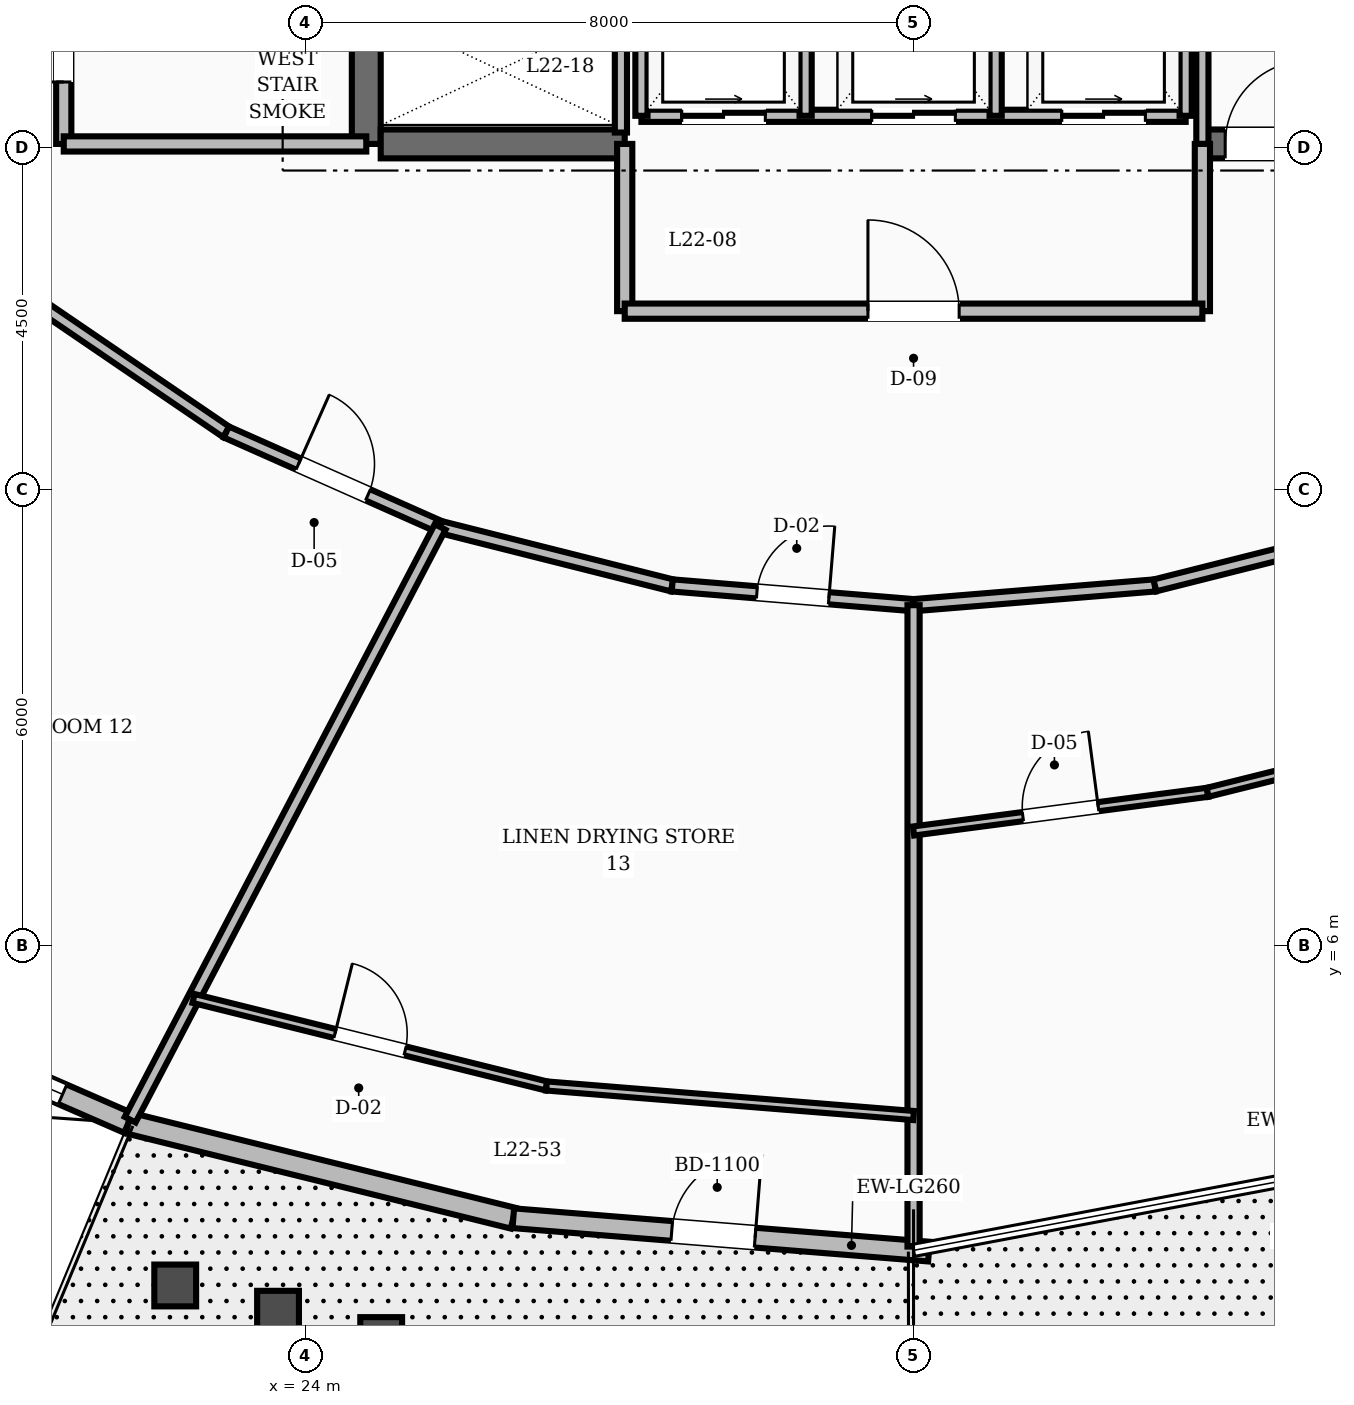
"""IFC4 building model, lengths in metres.
Left out: names, types, materials, properties, quantities, classifications, styles, units other than length and angle.
Written with IfcOpenShell. Run it as: python <this file> out.ifc"""

import sys

from ifc_helpers import new_model, si_unit, direction, frame, frame_2d, origin, place, context, subcontext, project, spatial, rectangle, extrude, element, fill, save


model = new_model("IFC4")
c1 = context("Model", 3, precision=1e-05, world=origin(), true_north=direction((0.0, 1.0)))
c2 = subcontext(c1, "Body", "Model", "MODEL_VIEW")
j1 = project(units=[si_unit("LENGTHUNIT", "METRE"), si_unit("PLANEANGLEUNIT", "RADIAN")], contexts=[c1])
p1 = place(None, origin())
s1 = spatial("IfcSite", under=j1, at=p1, CompositionType="ELEMENT")
p2 = place(p1, origin())
s2 = spatial("IfcBuilding", under=s1, at=p2, CompositionType="ELEMENT")
p3 = place(p2, frame((0.0, 0.0, 88.0)))
s3 = spatial("IfcBuildingStorey", under=s2, at=p3, CompositionType="ELEMENT", Elevation=88.0)
p4 = place(p3, frame((24.8, 16.55, 0.0), z_axis=(0.0, 0.0, 1.0), x_axis=(0.0, 1.0, 0.0)))
e1 = element("IfcWall", 1, at=p4, inside=s3, PredefinedType="SHEAR", context=c2, shape_type="SweptSolid", body=[
    extrude(rectangle(XDim=6.3, YDim=0.38, at=frame_2d((3.15, 0.0))), origin(), (0.0, 0.0, 1.0), 3.6),
])
p5 = place(p3, frame((24.99, 16.55, 0.0), z_axis=(0.0, 0.0, 1.0), x_axis=(1.0, 0.0, 0.0)))
e2 = element("IfcWall", 2, at=p5, inside=s3, PredefinedType="SHEAR", context=c2, shape_type="SweptSolid", body=[
    extrude(rectangle(XDim=3.21, YDim=0.38, at=frame_2d((1.605, 0.0))), origin(), (0.0, 0.0, 1.0), 3.6),
])
p6 = place(p3, frame((35.8, 16.55, 0.0), z_axis=(0.0, 0.0, 1.0), x_axis=(1.0, 0.0, 0.0)))
e3 = element("IfcWall", 3, at=p6, inside=s3, PredefinedType="SHEAR", context=c2, shape_type="SweptSolid", body=[
    extrude(rectangle(XDim=3.21, YDim=0.38, at=frame_2d((1.605, 0.0))), origin(), (0.0, 0.0, 1.0), 3.6),
])
p7 = place(p6, frame((0.3, 0.0, 0.0)))
e4 = element("IfcOpeningElement", 4, at=p7, cuts=e3, PredefinedType="OPENING", context=c2, shape_type="SweptSolid", body=[
    extrude(rectangle(XDim=1.1, YDim=2.1, at=frame_2d((0.55, 1.05))), frame((0.0, 0.2, 0.0), z_axis=(0.0, -1.0, 0.0), x_axis=(1.0, 0.0, 0.0)), (0.0, 0.0, 1.0), 0.4),
])
p8 = place(p3, frame((17.004, 5.702, 0.0), z_axis=(0.0, 0.0, 1.0), x_axis=(0.916744158445, -0.399474840205, 0.0)))
e5 = element("IfcWall", 5, at=p8, inside=s3, PredefinedType="STANDARD", context=c2, shape_type="SweptSolid", body=[
    extrude(rectangle(XDim=5.09, YDim=0.28, at=frame_2d((2.545, 0.0))), origin(), (0.0, 0.0, 1.0), 2.71),
])
p9 = place(p8, frame((0.945, 0.0, 0.8)))
e6 = element("IfcOpeningElement", 6, at=p9, cuts=e5, PredefinedType="OPENING", context=c2, shape_type="SweptSolid", body=[
    extrude(rectangle(XDim=3.2, YDim=1.65, at=frame_2d((1.6, 0.825))), frame((0.0, 0.15, 0.0), z_axis=(0.0, -1.0, 0.0), x_axis=(1.0, 0.0, 0.0)), (0.0, 0.0, 1.0), 0.3),
])
p10 = place(p3, frame((21.671, 3.669, 0.0), z_axis=(0.0, 0.0, 1.0), x_axis=(0.970745192344, -0.240111997913, 0.0)))
e7 = element("IfcWall", 7, at=p10, inside=s3, PredefinedType="STANDARD", context=c2, shape_type="SweptSolid", body=[
    extrude(rectangle(XDim=5.216, YDim=0.28, at=frame_2d((2.608, 0.0))), origin(), (0.0, 0.0, 1.0), 2.71),
])
p11 = place(p3, frame((26.734, 2.417, 0.0), z_axis=(0.0, 0.0, 1.0), x_axis=(0.996792879397, -0.080024718573, 0.0)))
e8 = element("IfcWall", 8, at=p11, inside=s3, PredefinedType="STANDARD", context=c2, shape_type="SweptSolid", body=[
    extrude(rectangle(XDim=5.485, YDim=0.26, at=frame_2d((2.743, 0.0))), origin(), (0.0, 0.0, 1.0), 2.71),
])
p12 = place(p11, frame((2.091, 0.0, 0.0)))
e9 = element("IfcOpeningElement", 9, at=p12, cuts=e8, PredefinedType="OPENING", context=c2, shape_type="SweptSolid", body=[
    extrude(rectangle(XDim=1.1, YDim=2.15, at=frame_2d((0.55, 1.075))), frame((0.0, 0.14, 0.0), z_axis=(0.0, -1.0, 0.0), x_axis=(1.0, 0.0, 0.0)), (0.0, 0.0, 1.0), 0.28),
])
p13 = place(p3, frame((20.82, 16.55, 0.0), z_axis=(0.0, 0.0, 1.0), x_axis=(0.0, 1.0, 0.0)))
e10 = element("IfcWall", 10, at=p13, inside=s3, PredefinedType="SOLIDWALL", context=c2, shape_type="SweptSolid", body=[
    extrude(rectangle(XDim=2.73, YDim=0.2, at=frame_2d((1.365, 0.0))), origin(), (0.0, 0.0, 1.0), 2.71),
])
p14 = place(p13, frame((0.815, 0.0, 0.0)))
e11 = element("IfcOpeningElement", 11, at=p14, cuts=e10, PredefinedType="OPENING", context=c2, shape_type="SweptSolid", body=[
    extrude(rectangle(XDim=1.1, YDim=2.1, at=frame_2d((0.55, 1.05))), frame((0.0, 0.11, 0.0), z_axis=(0.0, -1.0, 0.0), x_axis=(1.0, 0.0, 0.0)), (0.0, 0.0, 1.0), 0.22),
])
p15 = place(p3, frame((20.82, 16.55, 0.0), z_axis=(0.0, 0.0, 1.0), x_axis=(1.0, 0.0, 0.0)))
e12 = element("IfcWall", 12, at=p15, inside=s3, PredefinedType="SOLIDWALL", context=c2, shape_type="SweptSolid", body=[
    extrude(rectangle(XDim=3.98, YDim=0.2, at=frame_2d((1.99, 0.0))), origin(), (0.0, 0.0, 1.0), 2.71),
])
p16 = place(p3, frame((35.8, 16.55, 0.0), z_axis=(0.0, 0.0, 1.0), x_axis=(0.0, 1.0, 0.0)))
e13 = element("IfcWall", 13, at=p16, inside=s3, PredefinedType="SOLIDWALL", context=c2, shape_type="SweptSolid", body=[
    extrude(rectangle(XDim=3.3, YDim=0.16, at=frame_2d((1.65, 0.0))), origin(), (0.0, 0.0, 1.0), 2.71),
])
for number, where, z_axis, x_axis in (
    (14, (28.2, 14.35, 0.0), (0.0, 0.0, 1.0), (0.0, 1.0, 0.0)),
    (15, (35.8, 14.35, 0.0), (0.0, 0.0, 1.0), (0.0, 1.0, 0.0)),
):
    element("IfcWall", number, at=place(p3, frame(where, z_axis=z_axis, x_axis=x_axis)), inside=s3, PredefinedType="SOLIDWALL", context=c2, shape_type="SweptSolid", body=[
        extrude(rectangle(XDim=2.2, YDim=0.2, at=frame_2d((1.1, 0.0))), origin(), (0.0, 0.0, 1.0), 2.71),
    ])
p17 = place(p3, frame((28.2, 14.35, 0.0), z_axis=(0.0, 0.0, 1.0), x_axis=(1.0, 0.0, 0.0)))
e16 = element("IfcWall", 16, at=p17, inside=s3, PredefinedType="SOLIDWALL", context=c2, shape_type="SweptSolid", body=[
    extrude(rectangle(XDim=7.6, YDim=0.2, at=frame_2d((3.8, 0.0))), origin(), (0.0, 0.0, 1.0), 2.71),
])
p18 = place(p17, frame((3.2, 0.0, 0.0)))
e17 = element("IfcOpeningElement", 17, at=p18, cuts=e16, PredefinedType="OPENING", context=c2, shape_type="SweptSolid", body=[
    extrude(rectangle(XDim=1.2, YDim=2.1, at=frame_2d((0.6, 1.05))), frame((0.0, 0.11, 0.0), z_axis=(0.0, -1.0, 0.0), x_axis=(1.0, 0.0, 0.0)), (0.0, 0.0, 1.0), 0.22),
])
p19 = place(p3, frame((28.42, 16.92, 0.0), z_axis=(0.0, 0.0, 1.0), x_axis=(1.0, 0.0, 0.0)))
e18 = element("IfcWall", 18, at=p19, inside=s3, PredefinedType="SOLIDWALL", context=c2, shape_type="SweptSolid", body=[
    extrude(rectangle(XDim=7.16, YDim=0.16, at=frame_2d((3.58, 0.0))), origin(), (0.0, 0.0, 1.0), 2.71),
])
p20 = place(p19, frame((0.53, 0.0, 0.0)))
e19 = element("IfcOpeningElement", 19, at=p20, cuts=e18, PredefinedType="OPENING", context=c2, shape_type="SweptSolid", body=[
    extrude(rectangle(XDim=1.1, YDim=2.15, at=frame_2d((0.55, 1.075))), frame((0.0, 0.09, 0.0), z_axis=(0.0, -1.0, 0.0), x_axis=(1.0, 0.0, 0.0)), (0.0, 0.0, 1.0), 0.18),
])
p21 = place(p19, frame((3.03, 0.0, 0.0)))
e20 = element("IfcOpeningElement", 20, at=p21, cuts=e18, PredefinedType="OPENING", context=c2, shape_type="SweptSolid", body=[
    extrude(rectangle(XDim=1.1, YDim=2.15, at=frame_2d((0.55, 1.075))), frame((0.0, 0.09, 0.0), z_axis=(0.0, -1.0, 0.0), x_axis=(1.0, 0.0, 0.0)), (0.0, 0.0, 1.0), 0.18),
])
p22 = place(p19, frame((5.53, 0.0, 0.0)))
e21 = element("IfcOpeningElement", 21, at=p22, cuts=e18, PredefinedType="OPENING", context=c2, shape_type="SweptSolid", body=[
    extrude(rectangle(XDim=1.1, YDim=2.15, at=frame_2d((0.55, 1.075))), frame((0.0, 0.09, 0.0), z_axis=(0.0, -1.0, 0.0), x_axis=(1.0, 0.0, 0.0)), (0.0, 0.0, 1.0), 0.18),
])
for number, where, z_axis, x_axis in (
    (22, (28.42, 16.92, 0.0), (0.0, 0.0, 1.0), (0.0, 1.0, 0.0)),
    (23, (30.58, 16.92, 0.0), (0.0, 0.0, 1.0), (0.0, 1.0, 0.0)),
    (24, (33.08, 16.92, 0.0), (0.0, 0.0, 1.0), (0.0, 1.0, 0.0)),
    (25, (35.58, 16.92, 0.0), (0.0, 0.0, 1.0), (0.0, 1.0, 0.0)),
):
    element("IfcWall", number, at=place(p3, frame(where, z_axis=z_axis, x_axis=x_axis)), inside=s3, PredefinedType="SOLIDWALL", context=c2, shape_type="SweptSolid", body=[
        extrude(rectangle(XDim=2.76, YDim=0.16, at=frame_2d((1.38, 0.0))), origin(), (0.0, 0.0, 1.0), 2.71),
    ])
p23 = place(p3, frame((28.15, 16.7, 0.0), z_axis=(0.0, 0.0, 1.0), x_axis=(0.0, 1.0, 0.0)))
e26 = element("IfcWall", 26, at=p23, inside=s3, PredefinedType="SOLIDWALL", context=c2, shape_type="SweptSolid", body=[
    extrude(rectangle(XDim=6.05, YDim=0.16, at=frame_2d((3.025, 0.0))), origin(), (0.0, 0.0, 1.0), 2.71),
])
p24 = place(p3, frame((20.492, 14.441, 0.0), z_axis=(0.0, 0.0, 1.0), x_axis=(0.826293096206, -0.56324037423, 0.0)))
e27 = element("IfcWall", 27, at=p24, inside=s3, PredefinedType="SOLIDWALL", context=c2, shape_type="SweptSolid", body=[
    extrude(rectangle(XDim=2.985, YDim=0.16, at=frame_2d((1.492, 0.0))), origin(), (0.0, 0.0, 1.0), 2.71),
])
p25 = place(p3, frame((22.959, 12.76, 0.0), z_axis=(0.0, 0.0, 1.0), x_axis=(0.913952123493, -0.405822024984, 0.0)))
e28 = element("IfcWall", 28, at=p25, inside=s3, PredefinedType="SOLIDWALL", context=c2, shape_type="SweptSolid", body=[
    extrude(rectangle(XDim=3.078, YDim=0.16, at=frame_2d((1.539, 0.0))), origin(), (0.0, 0.0, 1.0), 2.71),
])
p26 = place(p25, frame((1.039, 0.0, 0.0)))
e29 = element("IfcOpeningElement", 29, at=p26, cuts=e28, PredefinedType="OPENING", context=c2, shape_type="SweptSolid", body=[
    extrude(rectangle(XDim=1.0, YDim=2.1, at=frame_2d((0.5, 1.05))), frame((0.0, 0.09, 0.0), z_axis=(0.0, -1.0, 0.0), x_axis=(1.0, 0.0, 0.0)), (0.0, 0.0, 1.0), 0.18),
])
p27 = place(p3, frame((25.772, 11.511, 0.0), z_axis=(0.0, 0.0, 1.0), x_axis=(0.969689238064, -0.244341526521, 0.0)))
e30 = element("IfcWall", 30, at=p27, inside=s3, PredefinedType="SOLIDWALL", context=c2, shape_type="SweptSolid", body=[
    extrude(rectangle(XDim=3.148, YDim=0.16, at=frame_2d((1.574, 0.0))), origin(), (0.0, 0.0, 1.0), 2.71),
])
p28 = place(p3, frame((28.825, 10.742, 0.0), z_axis=(0.0, 0.0, 1.0), x_axis=(0.996669377538, -0.081548463373, 0.0)))
e31 = element("IfcWall", 31, at=p28, inside=s3, PredefinedType="SOLIDWALL", context=c2, shape_type="SweptSolid", body=[
    extrude(rectangle(XDim=3.185, YDim=0.16, at=frame_2d((1.593, 0.0))), origin(), (0.0, 0.0, 1.0), 2.71),
])
p29 = place(p28, frame((1.118, 0.0, 0.0)))
e32 = element("IfcOpeningElement", 32, at=p29, cuts=e31, PredefinedType="OPENING", context=c2, shape_type="SweptSolid", body=[
    extrude(rectangle(XDim=0.95, YDim=2.1, at=frame_2d((0.475, 1.05))), frame((0.0, 0.09, 0.0), z_axis=(0.0, -1.0, 0.0), x_axis=(1.0, 0.0, 0.0)), (0.0, 0.0, 1.0), 0.18),
])
p30 = place(p3, frame((32.0, 10.482, 0.0), z_axis=(0.0, 0.0, 1.0), x_axis=(0.996669377538, 0.081548463373, 0.0)))
e33 = element("IfcWall", 33, at=p30, inside=s3, PredefinedType="SOLIDWALL", context=c2, shape_type="SweptSolid", body=[
    extrude(rectangle(XDim=3.185, YDim=0.16, at=frame_2d((1.593, 0.0))), origin(), (0.0, 0.0, 1.0), 2.71),
])
p31 = place(p3, frame((35.175, 10.742, 0.0), z_axis=(0.0, 0.0, 1.0), x_axis=(0.969689238064, 0.244341526521, 0.0)))
e34 = element("IfcWall", 34, at=p31, inside=s3, PredefinedType="SOLIDWALL", context=c2, shape_type="SweptSolid", body=[
    extrude(rectangle(XDim=3.148, YDim=0.16, at=frame_2d((1.574, 0.0))), origin(), (0.0, 0.0, 1.0), 2.71),
])
p32 = place(p3, frame((32.0, 10.482, 0.0), z_axis=(0.0, 0.0, 1.0), x_axis=(0.0, -1.0, 0.0)))
e35 = element("IfcWall", 35, at=p32, inside=s3, PredefinedType="SOLIDWALL", context=c2, shape_type="SweptSolid", body=[
    extrude(rectangle(XDim=8.438, YDim=0.16, at=frame_2d((4.219, 0.0))), origin(), (0.0, 0.0, 1.0), 2.71),
])
p33 = place(p3, frame((32.0, 7.511, 0.0), z_axis=(0.0, 0.0, 1.0), x_axis=(0.991445135258, 0.130524111843, 0.0)))
e36 = element("IfcWall", 36, at=p33, inside=s3, PredefinedType="PARTITIONING", context=c2, shape_type="SweptSolid", body=[
    extrude(rectangle(XDim=3.902, YDim=0.12, at=frame_2d((1.951, 0.0))), origin(), (0.0, 0.0, 1.0), 2.71),
])
p34 = place(p33, frame((1.451, 0.0, 0.0)))
e37 = element("IfcOpeningElement", 37, at=p34, cuts=e36, PredefinedType="OPENING", context=c2, shape_type="SweptSolid", body=[
    extrude(rectangle(XDim=1.0, YDim=2.1, at=frame_2d((0.5, 1.05))), frame((0.0, 0.07, 0.0), z_axis=(0.0, -1.0, 0.0), x_axis=(1.0, 0.0, 0.0)), (0.0, 0.0, 1.0), 0.14),
])
p35 = place(p3, frame((35.868, 8.02, 0.0), z_axis=(0.0, 0.0, 1.0), x_axis=(0.970310833778, 0.241861294657, 0.0)))
e38 = element("IfcWall", 38, at=p35, inside=s3, PredefinedType="PARTITIONING", context=c2, shape_type="SweptSolid", body=[
    extrude(rectangle(XDim=3.834, YDim=0.12, at=frame_2d((1.917, 0.0))), origin(), (0.0, 0.0, 1.0), 2.71),
])
p36 = place(p3, frame((25.772, 11.511, 0.0), z_axis=(0.0, 0.0, 1.0), x_axis=(-0.463452284004, -0.886121876748, 0.0)))
e39 = element("IfcWall", 39, at=p36, inside=s3, PredefinedType="SOLIDWALL", context=c2, shape_type="SweptSolid", body=[
    extrude(rectangle(XDim=8.8, YDim=0.16, at=frame_2d((4.4, 0.0))), origin(), (0.0, 0.0, 1.0), 2.71),
])
p37 = place(p3, frame((22.528, 5.308, 0.0), z_axis=(0.0, 0.0, 1.0), x_axis=(0.970606020149, -0.240673957149, 0.0)))
e40 = element("IfcWall", 40, at=p37, inside=s3, PredefinedType="PARTITIONING", context=c2, shape_type="SweptSolid", body=[
    extrude(rectangle(XDim=4.784, YDim=0.12, at=frame_2d((2.392, 0.0))), origin(), (0.0, 0.0, 1.0), 2.71),
])
p38 = place(p37, frame((1.917, 0.0, 0.0)))
e41 = element("IfcOpeningElement", 41, at=p38, cuts=e40, PredefinedType="OPENING", context=c2, shape_type="SweptSolid", body=[
    extrude(rectangle(XDim=0.95, YDim=2.1, at=frame_2d((0.475, 1.05))), frame((0.0, 0.07, 0.0), z_axis=(0.0, -1.0, 0.0), x_axis=(1.0, 0.0, 0.0)), (0.0, 0.0, 1.0), 0.14),
])
p39 = place(p3, frame((27.171, 4.156, 0.0), z_axis=(0.0, 0.0, 1.0), x_axis=(0.996776382437, -0.080229940889, 0.0)))
e42 = element("IfcWall", 42, at=p39, inside=s3, PredefinedType="PARTITIONING", context=c2, shape_type="SweptSolid", body=[
    extrude(rectangle(XDim=4.844, YDim=0.12, at=frame_2d((2.422, 0.0))), origin(), (0.0, 0.0, 1.0), 2.71),
])
p40 = place(p9, origin())
e43 = element("IfcWindow", 43, at=p40, inside=s3, PartitioningType="SINGLE_PANEL", PredefinedType="WINDOW", context=c2, shape_type="SweptSolid", body=[
    extrude(rectangle(XDim=3.2, YDim=1.65, at=frame_2d((1.6, 0.825))), frame((0.0, 0.03, 0.0), z_axis=(0.0, -1.0, 0.0), x_axis=(1.0, 0.0, 0.0)), (0.0, 0.0, 1.0), 0.06),
])
fill(e6, e43)
p41 = place(p12, origin())
e44 = element("IfcDoor", 44, at=p41, inside=s3, OperationType="SINGLE_SWING_RIGHT", PredefinedType="DOOR", context=c2, shape_type="SweptSolid", body=[
    extrude(rectangle(XDim=1.1, YDim=2.15, at=frame_2d((0.55, 1.075))), frame((0.0, 0.025, 0.0), z_axis=(0.0, -1.0, 0.0), x_axis=(1.0, 0.0, 0.0)), (0.0, 0.0, 1.0), 0.05),
])
fill(e9, e44)
p42 = place(p14, origin())
e45 = element("IfcDoor", 45, at=p42, inside=s3, OperationType="SINGLE_SWING_LEFT", PredefinedType="DOOR", context=c2, shape_type="SweptSolid", body=[
    extrude(rectangle(XDim=1.1, YDim=2.1, at=frame_2d((0.55, 1.05))), frame((0.0, 0.025, 0.0), z_axis=(0.0, -1.0, 0.0), x_axis=(1.0, 0.0, 0.0)), (0.0, 0.0, 1.0), 0.05),
])
fill(e11, e45)
p43 = place(p7, origin())
e46 = element("IfcDoor", 46, at=p43, inside=s3, OperationType="SINGLE_SWING_RIGHT", PredefinedType="DOOR", context=c2, shape_type="SweptSolid", body=[
    extrude(rectangle(XDim=1.1, YDim=2.1, at=frame_2d((0.55, 1.05))), frame((0.0, 0.025, 0.0), z_axis=(0.0, -1.0, 0.0), x_axis=(1.0, 0.0, 0.0)), (0.0, 0.0, 1.0), 0.05),
])
fill(e4, e46)
p44 = place(p18, origin())
e47 = element("IfcDoor", 47, at=p44, inside=s3, OperationType="SINGLE_SWING_LEFT", PredefinedType="DOOR", context=c2, shape_type="SweptSolid", body=[
    extrude(rectangle(XDim=1.2, YDim=2.1, at=frame_2d((0.6, 1.05))), frame((0.0, 0.025, 0.0), z_axis=(0.0, -1.0, 0.0), x_axis=(1.0, 0.0, 0.0)), (0.0, 0.0, 1.0), 0.05),
])
fill(e17, e47)
p45 = place(p20, origin())
e48 = element("IfcDoor", 48, at=p45, inside=s3, OperationType="SLIDING_TO_RIGHT", PredefinedType="DOOR", context=c2, shape_type="SweptSolid", body=[
    extrude(rectangle(XDim=1.1, YDim=2.15, at=frame_2d((0.55, 1.075))), frame((0.0, 0.025, 0.0), z_axis=(0.0, -1.0, 0.0), x_axis=(1.0, 0.0, 0.0)), (0.0, 0.0, 1.0), 0.05),
])
fill(e19, e48)
p46 = place(p21, origin())
e49 = element("IfcDoor", 49, at=p46, inside=s3, OperationType="SLIDING_TO_RIGHT", PredefinedType="DOOR", context=c2, shape_type="SweptSolid", body=[
    extrude(rectangle(XDim=1.1, YDim=2.15, at=frame_2d((0.55, 1.075))), frame((0.0, 0.025, 0.0), z_axis=(0.0, -1.0, 0.0), x_axis=(1.0, 0.0, 0.0)), (0.0, 0.0, 1.0), 0.05),
])
fill(e20, e49)
p47 = place(p22, origin())
e50 = element("IfcDoor", 50, at=p47, inside=s3, OperationType="SLIDING_TO_RIGHT", PredefinedType="DOOR", context=c2, shape_type="SweptSolid", body=[
    extrude(rectangle(XDim=1.1, YDim=2.15, at=frame_2d((0.55, 1.075))), frame((0.0, 0.025, 0.0), z_axis=(0.0, -1.0, 0.0), x_axis=(1.0, 0.0, 0.0)), (0.0, 0.0, 1.0), 0.05),
])
fill(e21, e50)
p48 = place(p34, origin())
e51 = element("IfcDoor", 51, at=p48, inside=s3, OperationType="SINGLE_SWING_RIGHT", PredefinedType="DOOR", context=c2, shape_type="SweptSolid", body=[
    extrude(rectangle(XDim=1.0, YDim=2.1, at=frame_2d((0.5, 1.05))), frame((0.0, 0.025, 0.0), z_axis=(0.0, -1.0, 0.0), x_axis=(1.0, 0.0, 0.0)), (0.0, 0.0, 1.0), 0.05),
])
fill(e37, e51)
p49 = place(p26, origin())
e52 = element("IfcDoor", 52, at=p49, inside=s3, OperationType="SINGLE_SWING_LEFT", PredefinedType="DOOR", context=c2, shape_type="SweptSolid", body=[
    extrude(rectangle(XDim=1.0, YDim=2.1, at=frame_2d((0.5, 1.05))), frame((0.0, 0.025, 0.0), z_axis=(0.0, -1.0, 0.0), x_axis=(1.0, 0.0, 0.0)), (0.0, 0.0, 1.0), 0.05),
])
fill(e29, e52)
p50 = place(p29, origin())
e53 = element("IfcDoor", 53, at=p50, inside=s3, OperationType="SINGLE_SWING_RIGHT", PredefinedType="DOOR", context=c2, shape_type="SweptSolid", body=[
    extrude(rectangle(XDim=0.95, YDim=2.1, at=frame_2d((0.475, 1.05))), frame((0.0, 0.025, 0.0), z_axis=(0.0, -1.0, 0.0), x_axis=(1.0, 0.0, 0.0)), (0.0, 0.0, 1.0), 0.05),
])
fill(e32, e53)
p51 = place(p38, origin())
e54 = element("IfcDoor", 54, at=p51, inside=s3, OperationType="SINGLE_SWING_LEFT", PredefinedType="DOOR", context=c2, shape_type="SweptSolid", body=[
    extrude(rectangle(XDim=0.95, YDim=2.1, at=frame_2d((0.475, 1.05))), frame((0.0, 0.025, 0.0), z_axis=(0.0, -1.0, 0.0), x_axis=(1.0, 0.0, 0.0)), (0.0, 0.0, 1.0), 0.05),
])
fill(e41, e54)
save(model, sys.argv[1])
